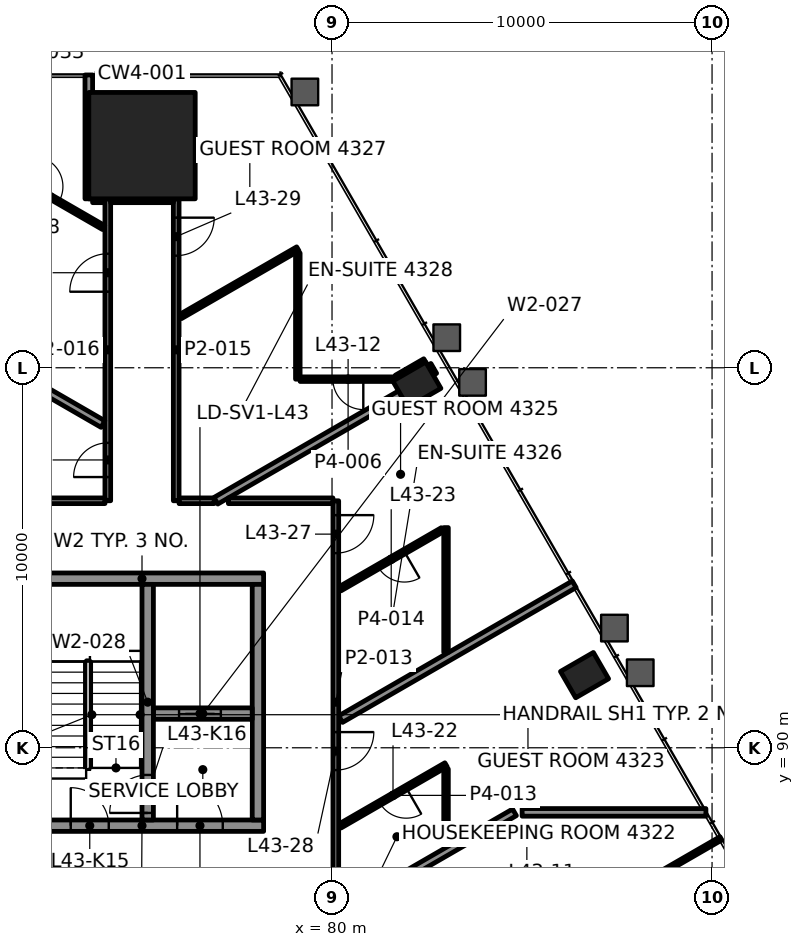
"""IFC4 building model, lengths in metres.
Left out: names, types, materials, properties, quantities, classifications, styles, units other than length and angle.
Written with IfcOpenShell. Run it as: python <this file> out.ifc"""

import sys

from ifc_helpers import new_model, si_unit, direction, frame, frame_2d, origin, origin_2d, place, context, subcontext, project, spatial, rectangle, hollow_rectangle, extrude, element, fill, save


model = new_model("IFC4")
c1 = context("Model", 3, precision=1e-05, world=origin(), true_north=direction((0.0, 1.0)))
c2 = subcontext(c1, "Body", "Model", "MODEL_VIEW")
j1 = project(units=[si_unit("LENGTHUNIT", "METRE"), si_unit("PLANEANGLEUNIT", "RADIAN")], contexts=[c1])
p1 = place(None, origin())
s1 = spatial("IfcSite", under=j1, at=p1, CompositionType="ELEMENT")
p2 = place(p1, origin())
s2 = spatial("IfcBuilding", under=s1, at=p2, CompositionType="ELEMENT")
p3 = place(p2, frame((0.0, 0.0, 187.0)))
s3 = spatial("IfcBuildingStorey", under=s2, at=p3, CompositionType="ELEMENT", Elevation=187.0)
p4 = place(p3, frame((75.0, 105.845, 0.0), z_axis=(0.0, 0.0, 1.0), x_axis=(-1.0, 0.0, 0.0)))
e1 = element("IfcColumn", 1, at=p4, inside=s3, PredefinedType="COLUMN", context=c2, shape_type="SweptSolid", body=[
    extrude(rectangle(XDim=2.8, YDim=2.8, at=origin_2d()), origin(), (0.0, 0.0, 1.0), 3.9),
])
for number, where, z_axis, x_axis in (
    (2, (86.645, 91.912, -0.0), (0.0, 0.0, 1.0), (-0.5, 0.866, 0.0)),
    (3, (82.232, 99.553, -0.0), (0.0, 0.0, 1.0), (-0.5, 0.866, 0.0)),
):
    element("IfcColumn", number, at=place(p3, frame(where, z_axis=z_axis, x_axis=x_axis)), inside=s3, PredefinedType="COLUMN", context=c2, shape_type="SweptSolid", body=[
        extrude(hollow_rectangle(XDim=0.8, YDim=1.0, WallThickness=0.05, at=origin_2d()), origin(), (0.0, 0.0, 1.0), 3.9),
    ])
p5 = place(p3, frame((71.8, 87.95, 0.0), z_axis=(0.0, 0.0, 1.0), x_axis=(1.0, 0.0, 0.0)))
e4 = element("IfcWall", 4, at=p5, inside=s3, PredefinedType="SHEAR", context=c2, shape_type="SweptSolid", body=[
    extrude(rectangle(XDim=6.4, YDim=0.3, at=frame_2d((3.2, 0.0))), origin(), (0.0, 0.0, 1.0), 3.7),
])
p6 = place(p5, frame((1.325, 0.0, 0.0)))
e5 = element("IfcOpeningElement", 5, at=p6, cuts=e4, PredefinedType="OPENING", context=c2, shape_type="SweptSolid", body=[
    extrude(rectangle(XDim=1.0, YDim=2.1, at=frame_2d((0.5, 1.05))), frame((0.0, 0.16, 0.0), z_axis=(0.0, -1.0, 0.0), x_axis=(1.0, 0.0, 0.0)), (0.0, 0.0, 1.0), 0.32),
])
p7 = place(p5, frame((4.125, 0.0, 0.0)))
e6 = element("IfcOpeningElement", 6, at=p7, cuts=e4, PredefinedType="OPENING", context=c2, shape_type="SweptSolid", body=[
    extrude(rectangle(XDim=1.2, YDim=2.1, at=frame_2d((0.6, 1.05))), frame((0.0, 0.16, 0.0), z_axis=(0.0, -1.0, 0.0), x_axis=(1.0, 0.0, 0.0)), (0.0, 0.0, 1.0), 0.32),
])
p8 = place(p3, frame((71.8, 94.45, 0.0), z_axis=(0.0, 0.0, 1.0), x_axis=(1.0, 0.0, 0.0)))
e7 = element("IfcWall", 7, at=p8, inside=s3, PredefinedType="SHEAR", context=c2, shape_type="SweptSolid", body=[
    extrude(rectangle(XDim=6.4, YDim=0.3, at=frame_2d((3.2, 0.0))), origin(), (0.0, 0.0, 1.0), 3.7),
])
p9 = place(p3, frame((78.05, 88.1, 0.0), z_axis=(0.0, 0.0, 1.0), x_axis=(0.0, 1.0, 0.0)))
e8 = element("IfcWall", 8, at=p9, inside=s3, PredefinedType="SHEAR", context=c2, shape_type="SweptSolid", body=[
    extrude(rectangle(XDim=6.2, YDim=0.3, at=frame_2d((3.1, 0.0))), origin(), (0.0, 0.0, 1.0), 3.7),
])
p10 = place(p3, frame((75.3, 90.9, 0.0), z_axis=(0.0, 0.0, 1.0), x_axis=(1.0, 0.0, 0.0)))
e9 = element("IfcWall", 9, at=p10, inside=s3, PredefinedType="SHEAR", context=c2, shape_type="SweptSolid", body=[
    extrude(rectangle(XDim=2.6, YDim=0.3, at=frame_2d((1.3, 0.0))), origin(), (0.0, 0.0, 1.0), 3.7),
])
p11 = place(p10, frame((0.675, 0.0, 0.0)))
e10 = element("IfcOpeningElement", 10, at=p11, cuts=e9, PredefinedType="OPENING", context=c2, shape_type="SweptSolid", body=[
    extrude(rectangle(XDim=1.1, YDim=2.1, at=frame_2d((0.55, 1.05))), frame((0.0, 0.16, 0.0), z_axis=(0.0, -1.0, 0.0), x_axis=(1.0, 0.0, 0.0)), (0.0, 0.0, 1.0), 0.32),
])
p12 = place(p3, frame((75.15, 88.1, 0.0), z_axis=(0.0, 0.0, 1.0), x_axis=(0.0, 1.0, 0.0)))
e11 = element("IfcWall", 11, at=p12, inside=s3, PredefinedType="SHEAR", context=c2, shape_type="SweptSolid", body=[
    extrude(rectangle(XDim=6.2, YDim=0.3, at=frame_2d((3.1, 0.0))), origin(), (0.0, 0.0, 1.0), 3.7),
])
p13 = place(p12, frame((0.185, 0.0, 0.0)))
e12 = element("IfcOpeningElement", 12, at=p13, cuts=e11, PredefinedType="OPENING", context=c2, shape_type="SweptSolid", body=[
    extrude(rectangle(XDim=1.0, YDim=2.1, at=frame_2d((0.5, 1.05))), frame((0.0, 0.16, 0.0), z_axis=(0.0, -1.0, 0.0), x_axis=(1.0, 0.0, 0.0)), (0.0, 0.0, 1.0), 0.32),
])
p14 = place(p3, frame((83.06, 87.8, 0.0), z_axis=(0.0, 0.0, 1.0), x_axis=(1.0, 0.0, 0.0)))
e13 = element("IfcWall", 13, at=p14, inside=s3, PredefinedType="PARTITIONING", context=c2, shape_type="SweptSolid", body=[
    extrude(rectangle(XDim=0.564, YDim=0.12, at=frame_2d((0.282, 0.0))), origin(), (0.0, 0.0, 1.0), 3.1),
])
p15 = place(p3, frame((85.002, 88.3, 0.0), z_axis=(0.0, 0.0, 1.0), x_axis=(1.0, 0.0, 0.0)))
e14 = element("IfcWall", 14, at=p15, inside=s3, PredefinedType="PARTITIONING", context=c2, shape_type="SweptSolid", body=[
    extrude(rectangle(XDim=4.836, YDim=0.2, at=frame_2d((2.418, 0.0))), origin(), (0.0, 0.0, 1.0), 3.022),
])
p16 = place(p3, frame((75.975, 96.5, 0.0), z_axis=(0.0, 0.0, 1.0), x_axis=(1.0, 0.0, 0.0)))
e15 = element("IfcWall", 15, at=p16, inside=s3, PredefinedType="PARTITIONING", context=c2, shape_type="SweptSolid", body=[
    extrude(rectangle(XDim=0.925, YDim=0.15, at=frame_2d((0.463, 0.0))), origin(), (0.0, 0.0, 1.0), 3.1),
])
p17 = place(p3, frame((81.686, 99.7, 0.0), z_axis=(0.0, 0.0, 1.0), x_axis=(-1.0, 0.0, 0.0)))
e16 = element("IfcWall", 16, at=p17, inside=s3, PredefinedType="PARTITIONING", context=c2, shape_type="SweptSolid", body=[
    extrude(rectangle(XDim=2.526, YDim=0.12, at=frame_2d((1.263, 0.0))), origin(), (0.0, 0.0, 1.0), 3.1),
])
p18 = place(p17, frame((0.863, 0.0, 0.0)))
e17 = element("IfcOpeningElement", 17, at=p18, cuts=e16, PredefinedType="OPENING", context=c2, shape_type="SweptSolid", body=[
    extrude(rectangle(XDim=0.8, YDim=2.1, at=frame_2d((0.4, 1.05))), frame((0.0, 0.07, 0.0), z_axis=(0.0, -1.0, 0.0), x_axis=(1.0, 0.0, 0.0)), (0.0, 0.0, 1.0), 0.14),
])
p19 = place(p3, frame((73.7, 104.445, 0.0), z_axis=(0.0, 0.0, 1.0), x_axis=(1.0, 0.0, 0.0)))
e18 = element("IfcWall", 18, at=p19, inside=s3, PredefinedType="PARTITIONING", context=c2, shape_type="SweptSolid", body=[
    extrude(rectangle(XDim=0.324, YDim=0.2, at=frame_2d((0.162, 0.0))), origin(), (0.0, 0.0, 1.0), 3.1),
])
p20 = place(p3, frame((85.737, 85.02, 0.0), z_axis=(0.0, 0.0, 1.0), x_axis=(0.866014867177, 0.500018249495, 0.0)))
e19 = element("IfcWall", 19, at=p20, inside=s3, PredefinedType="PARTITIONING", context=c2, shape_type="SweptSolid", body=[
    extrude(rectangle(XDim=5.192, YDim=0.1, at=frame_2d((2.596, 0.0))), origin(), (0.0, 0.0, 1.0), 3.022),
])
p21 = place(p3, frame((79.197, 85.065, 0.0), z_axis=(0.0, 0.0, 1.0), x_axis=(0.86602410867, 0.500002243197, 0.0)))
e20 = element("IfcWall", 20, at=p21, inside=s3, PredefinedType="PARTITIONING", context=c2, shape_type="SweptSolid", body=[
    extrude(rectangle(XDim=6.471, YDim=0.2, at=frame_2d((3.235, 0.0))), origin(), (0.0, 0.0, 1.0), 3.1),
])
p22 = place(p3, frame((83.0, 89.553, 0.0), z_axis=(0.0, 0.0, 1.0), x_axis=(-0.86604299788, -0.499969524894, 0.0)))
e21 = element("IfcWall", 21, at=p22, inside=s3, PredefinedType="PARTITIONING", context=c2, shape_type="SweptSolid", body=[
    extrude(rectangle(XDim=3.222, YDim=0.12, at=frame_2d((1.611, 0.0))), origin(), (0.0, 0.0, 1.0), 3.1),
])
p23 = place(p22, frame((1.211, 0.0, 0.0)))
e22 = element("IfcOpeningElement", 22, at=p23, cuts=e21, PredefinedType="OPENING", context=c2, shape_type="SweptSolid", body=[
    extrude(rectangle(XDim=0.8, YDim=2.1, at=frame_2d((0.4, 1.05))), frame((0.0, 0.07, 0.0), z_axis=(0.0, -1.0, 0.0), x_axis=(1.0, 0.0, 0.0)), (0.0, 0.0, 1.0), 0.14),
])
p24 = place(p3, frame((80.227, 90.754, 0.0), z_axis=(0.0, 0.0, 1.0), x_axis=(0.866028616566, 0.499994435258, 0.0)))
e23 = element("IfcWall", 23, at=p24, inside=s3, PredefinedType="PARTITIONING", context=c2, shape_type="SweptSolid", body=[
    extrude(rectangle(XDim=7.097, YDim=0.2, at=frame_2d((3.548, 0.0))), origin(), (0.0, 0.0, 1.0), 3.022),
])
p25 = place(p3, frame((82.905, 95.739, 0.0), z_axis=(0.0, 0.0, 1.0), x_axis=(-0.866028856698, -0.499994019331, 0.0)))
e24 = element("IfcWall", 24, at=p25, inside=s3, PredefinedType="PARTITIONING", context=c2, shape_type="SweptSolid", body=[
    extrude(rectangle(XDim=3.113, YDim=0.12, at=frame_2d((1.556, 0.0))), origin(), (0.0, 0.0, 1.0), 3.1),
])
p26 = place(p25, frame((1.156, 0.0, 0.0)))
e25 = element("IfcOpeningElement", 25, at=p26, cuts=e24, PredefinedType="OPENING", context=c2, shape_type="SweptSolid", body=[
    extrude(rectangle(XDim=0.8, YDim=2.1, at=frame_2d((0.4, 1.05))), frame((0.0, 0.07, 0.0), z_axis=(0.0, -1.0, 0.0), x_axis=(1.0, 0.0, 0.0)), (0.0, 0.0, 1.0), 0.14),
])
p27 = place(p3, frame((76.943, 96.5, 0.0), z_axis=(0.0, 0.0, 1.0), x_axis=(0.866015917575, 0.500016430238, 0.0)))
e26 = element("IfcWall", 26, at=p27, inside=s3, PredefinedType="PARTITIONING", context=c2, shape_type="SweptSolid", body=[
    extrude(rectangle(XDim=5.607, YDim=0.2, at=frame_2d((2.804, 0.0))), origin(), (0.0, 0.0, 1.0), 3.1),
])
p28 = place(p3, frame((81.712, 99.715, 0.0), z_axis=(0.0, 0.0, 1.0), x_axis=(0.866092063448, 0.499884524299, 0.0)))
e27 = element("IfcWall", 27, at=p28, inside=s3, PredefinedType="PARTITIONING", context=c2, shape_type="SweptSolid", body=[
    extrude(rectangle(XDim=0.869, YDim=0.2, at=frame_2d((0.435, 0.0))), origin(), (0.0, 0.0, 1.0), 3.1),
])
p29 = place(p3, frame((76.01, 101.346, 0.0), z_axis=(0.0, 0.0, 1.0), x_axis=(0.866045460162, 0.499965259726, 0.0)))
e28 = element("IfcWall", 28, at=p29, inside=s3, PredefinedType="PARTITIONING", context=c2, shape_type="SweptSolid", body=[
    extrude(rectangle(XDim=3.569, YDim=0.12, at=frame_2d((1.784, 0.0))), origin(), (0.0, 0.0, 1.0), 3.1),
])
p30 = place(p3, frame((83.0, 87.8, 0.0), z_axis=(0.0, 0.0, 1.0), x_axis=(0.0, 1.0, 0.0)))
e29 = element("IfcWall", 29, at=p30, inside=s3, PredefinedType="PARTITIONING", context=c2, shape_type="SweptSolid", body=[
    extrude(rectangle(XDim=1.644, YDim=0.12, at=frame_2d((0.822, 0.0))), origin(), (0.0, 0.0, 1.0), 3.1),
])
p31 = place(p3, frame((83.0, 92.51, 0.0), z_axis=(0.0, 0.0, 1.0), x_axis=(0.0, 1.0, 0.0)))
e30 = element("IfcWall", 30, at=p31, inside=s3, PredefinedType="PARTITIONING", context=c2, shape_type="SweptSolid", body=[
    extrude(rectangle(XDim=3.283, YDim=0.12, at=frame_2d((1.642, 0.0))), origin(), (0.0, 0.0, 1.0), 3.1),
])
p32 = place(p3, frame((80.1, 96.5, 0.0), z_axis=(0.0, 0.0, 1.0), x_axis=(0.0, -1.0, 0.0)))
e31 = element("IfcWall", 31, at=p32, inside=s3, PredefinedType="PARTITIONING", context=c2, shape_type="SweptSolid", body=[
    extrude(rectangle(XDim=10.6, YDim=0.15, at=frame_2d((5.3, 0.0))), origin(), (0.0, 0.0, 1.0), 3.022),
])
p33 = place(p32, frame((0.377, 0.0, 0.0)))
e32 = element("IfcOpeningElement", 32, at=p33, cuts=e31, PredefinedType="OPENING", context=c2, shape_type="SweptSolid", body=[
    extrude(rectangle(XDim=1.0, YDim=2.1, at=frame_2d((0.5, 1.05))), frame((0.0, 0.085, 0.0), z_axis=(0.0, -1.0, 0.0), x_axis=(1.0, 0.0, 0.0)), (0.0, 0.0, 1.0), 0.17),
])
p34 = place(p32, frame((6.087, 0.0, 0.0)))
e33 = element("IfcOpeningElement", 33, at=p34, cuts=e31, PredefinedType="OPENING", context=c2, shape_type="SweptSolid", body=[
    extrude(rectangle(XDim=1.0, YDim=2.1, at=frame_2d((0.5, 1.05))), frame((0.0, 0.085, 0.0), z_axis=(0.0, -1.0, 0.0), x_axis=(1.0, 0.0, 0.0)), (0.0, 0.0, 1.0), 0.17),
])
p35 = place(p3, frame((79.1, 99.7, 0.0), z_axis=(0.0, 0.0, 1.0), x_axis=(0.0, 1.0, 0.0)))
e34 = element("IfcWall", 34, at=p35, inside=s3, PredefinedType="PARTITIONING", context=c2, shape_type="SweptSolid", body=[
    extrude(rectangle(XDim=3.321, YDim=0.12, at=frame_2d((1.661, 0.0))), origin(), (0.0, 0.0, 1.0), 3.1),
])
p36 = place(p3, frame((75.9, 104.445, 0.0), z_axis=(0.0, 0.0, 1.0), x_axis=(0.0, -1.0, 0.0)))
e35 = element("IfcWall", 35, at=p36, inside=s3, PredefinedType="PARTITIONING", context=c2, shape_type="SweptSolid", body=[
    extrude(rectangle(XDim=7.945, YDim=0.15, at=frame_2d((3.972, 0.0))), origin(), (0.0, 0.0, 1.0), 3.1),
])
p37 = place(p36, frame((0.495, 0.0, 0.0)))
e36 = element("IfcOpeningElement", 36, at=p37, cuts=e35, PredefinedType="OPENING", context=c2, shape_type="SweptSolid", body=[
    extrude(rectangle(XDim=1.0, YDim=2.1, at=frame_2d((0.5, 1.05))), frame((0.0, 0.085, 0.0), z_axis=(0.0, -1.0, 0.0), x_axis=(1.0, 0.0, 0.0)), (0.0, 0.0, 1.0), 0.17),
])
p38 = place(p3, frame((74.1, 96.5, 0.0), z_axis=(0.0, 0.0, 1.0), x_axis=(0.0, 1.0, 0.0)))
e37 = element("IfcWall", 37, at=p38, inside=s3, PredefinedType="PARTITIONING", context=c2, shape_type="SweptSolid", body=[
    extrude(rectangle(XDim=7.945, YDim=0.15, at=frame_2d((3.973, 0.0))), origin(), (0.0, 0.0, 1.0), 3.1),
])
p39 = place(p38, frame((0.624, 0.0, 0.0)))
e38 = element("IfcOpeningElement", 38, at=p39, cuts=e37, PredefinedType="OPENING", context=c2, shape_type="SweptSolid", body=[
    extrude(rectangle(XDim=0.9, YDim=2.1, at=frame_2d((0.45, 1.05))), frame((0.0, 0.085, 0.0), z_axis=(0.0, -1.0, 0.0), x_axis=(1.0, 0.0, 0.0)), (0.0, 0.0, 1.0), 0.17),
])
p40 = place(p38, frame((5.501, 0.0, 0.0)))
e39 = element("IfcOpeningElement", 39, at=p40, cuts=e37, PredefinedType="OPENING", context=c2, shape_type="SweptSolid", body=[
    extrude(rectangle(XDim=1.0, YDim=2.1, at=frame_2d((0.5, 1.05))), frame((0.0, 0.085, 0.0), z_axis=(0.0, -1.0, 0.0), x_axis=(1.0, 0.0, 0.0)), (0.0, 0.0, 1.0), 0.17),
])
p41 = place(p3, frame((73.6, 104.446, 0.0), z_axis=(0.0, 0.0, 1.0), x_axis=(0.0, 1.0, 0.0)))
e40 = element("IfcWall", 40, at=p41, inside=s3, PredefinedType="PARTITIONING", context=c2, shape_type="SweptSolid", body=[
    extrude(rectangle(XDim=3.259, YDim=0.2, at=frame_2d((1.63, 0.0))), origin(), (0.0, 0.0, 1.0), 3.1),
])
p42 = place(p3, frame((82.665, 99.803, 0.0), z_axis=(0.0, 0.0, 1.0), x_axis=(-0.499910707084, 0.866076950936, 0.0)))
e41 = element("IfcWall", 41, at=p42, inside=s3, PredefinedType="PARTITIONING", context=c2, shape_type="SweptSolid", body=[
    extrude(rectangle(XDim=0.299, YDim=0.2, at=frame_2d((0.15, 0.0))), origin(), (0.0, 0.0, 1.0), 3.1),
])
p43 = place(p3, frame((71.2, 105.301, 0.0), z_axis=(0.0, 0.0, 1.0), x_axis=(0.866010186656, -0.500026355914, 0.0)))
e42 = element("IfcWall", 42, at=p43, inside=s3, PredefinedType="PARTITIONING", context=c2, shape_type="SweptSolid", body=[
    extrude(rectangle(XDim=3.222, YDim=0.12, at=frame_2d((1.611, 0.0))), origin(), (0.0, 0.0, 1.0), 3.1),
])
p44 = place(p43, frame((1.061, 0.0, 0.0)))
e43 = element("IfcOpeningElement", 43, at=p44, cuts=e42, PredefinedType="OPENING", context=c2, shape_type="SweptSolid", body=[
    extrude(rectangle(XDim=0.8, YDim=2.1, at=frame_2d((0.4, 1.05))), frame((0.0, 0.07, 0.0), z_axis=(0.0, -1.0, 0.0), x_axis=(1.0, 0.0, 0.0)), (0.0, 0.0, 1.0), 0.14),
])
p45 = place(p3, frame((73.973, 98.518, 0.0), z_axis=(0.0, 0.0, 1.0), x_axis=(-0.866017662945, 0.500013407287, 0.0)))
e44 = element("IfcWall", 44, at=p45, inside=s3, PredefinedType="PARTITIONING", context=c2, shape_type="SweptSolid", body=[
    extrude(rectangle(XDim=6.852, YDim=0.2, at=frame_2d((3.426, 0.0))), origin(), (0.0, 0.0, 1.0), 3.1),
])
p46 = place(p3, frame((70.875, 96.5, 0.0), z_axis=(0.0, 0.0, 1.0), x_axis=(1.0, 0.0, 0.0)))
e45 = element("IfcWall", 45, at=p46, inside=s3, PredefinedType="PARTITIONING", context=c2, shape_type="SweptSolid", body=[
    extrude(rectangle(XDim=3.149, YDim=0.15, at=frame_2d((1.575, 0.0))), origin(), (0.0, 0.0, 1.0), 3.1),
])
p47 = place(p3, frame((77.273, 96.5, 0.0), z_axis=(0.0, 0.0, 1.0), x_axis=(1.0, 0.0, 0.0)))
e46 = element("IfcWall", 46, at=p47, inside=s3, PredefinedType="PARTITIONING", context=c2, shape_type="SweptSolid", body=[
    extrude(rectangle(XDim=2.752, YDim=0.15, at=frame_2d((1.376, 0.0))), origin(), (0.0, 0.0, 1.0), 3.1),
])
p48 = place(p3, frame((74.175, 104.445, 0.0), z_axis=(0.0, 0.0, 1.0), x_axis=(1.0, 0.0, 0.0)))
e47 = element("IfcWall", 47, at=p48, inside=s3, PredefinedType="PARTITIONING", context=c2, shape_type="SweptSolid", body=[
    extrude(rectangle(XDim=1.649, YDim=0.2, at=frame_2d((0.825, 0.0))), origin(), (0.0, 0.0, 1.0), 3.097),
])
p49 = place(p18, origin())
e48 = element("IfcDoor", 48, at=p49, inside=s3, OperationType="SINGLE_SWING_RIGHT", PredefinedType="DOOR", context=c2, shape_type="SweptSolid", body=[
    extrude(rectangle(XDim=0.8, YDim=2.1, at=frame_2d((0.4, 1.05))), frame((0.0, 0.025, 0.0), z_axis=(0.0, -1.0, 0.0), x_axis=(1.0, 0.0, 0.0)), (0.0, 0.0, 1.0), 0.05),
])
fill(e17, e48)
p50 = place(p23, origin())
e49 = element("IfcDoor", 49, at=p50, inside=s3, OperationType="SINGLE_SWING_RIGHT", PredefinedType="DOOR", context=c2, shape_type="SweptSolid", body=[
    extrude(rectangle(XDim=0.8, YDim=2.1, at=frame_2d((0.4, 1.05))), frame((0.0, 0.025, 0.0), z_axis=(0.0, -1.0, 0.0), x_axis=(1.0, 0.0, 0.0)), (0.0, 0.0, 1.0), 0.05),
])
fill(e22, e49)
p51 = place(p26, origin())
e50 = element("IfcDoor", 50, at=p51, inside=s3, OperationType="SINGLE_SWING_RIGHT", PredefinedType="DOOR", context=c2, shape_type="SweptSolid", body=[
    extrude(rectangle(XDim=0.8, YDim=2.1, at=frame_2d((0.4, 1.05))), frame((0.0, 0.025, 0.0), z_axis=(0.0, -1.0, 0.0), x_axis=(1.0, 0.0, 0.0)), (0.0, 0.0, 1.0), 0.05),
])
fill(e25, e50)
p52 = place(p33, origin())
e51 = element("IfcDoor", 51, at=p52, inside=s3, OperationType="SINGLE_SWING_LEFT", PredefinedType="DOOR", context=c2, shape_type="SweptSolid", body=[
    extrude(rectangle(XDim=1.0, YDim=2.1, at=frame_2d((0.5, 1.05))), frame((0.0, 0.025, 0.0), z_axis=(0.0, -1.0, 0.0), x_axis=(1.0, 0.0, 0.0)), (0.0, 0.0, 1.0), 0.05),
])
fill(e32, e51)
p53 = place(p34, origin())
e52 = element("IfcDoor", 52, at=p53, inside=s3, OperationType="SINGLE_SWING_LEFT", PredefinedType="DOOR", context=c2, shape_type="SweptSolid", body=[
    extrude(rectangle(XDim=1.0, YDim=2.1, at=frame_2d((0.5, 1.05))), frame((0.0, 0.025, 0.0), z_axis=(0.0, -1.0, 0.0), x_axis=(1.0, 0.0, 0.0)), (0.0, 0.0, 1.0), 0.05),
])
fill(e33, e52)
p54 = place(p37, origin())
e53 = element("IfcDoor", 53, at=p54, inside=s3, OperationType="SINGLE_SWING_LEFT", PredefinedType="DOOR", context=c2, shape_type="SweptSolid", body=[
    extrude(rectangle(XDim=1.0, YDim=2.1, at=frame_2d((0.5, 1.05))), frame((0.0, 0.025, 0.0), z_axis=(0.0, -1.0, 0.0), x_axis=(1.0, 0.0, 0.0)), (0.0, 0.0, 1.0), 0.05),
])
fill(e36, e53)
p55 = place(p39, origin())
e54 = element("IfcDoor", 54, at=p55, inside=s3, OperationType="SINGLE_SWING_RIGHT", PredefinedType="DOOR", context=c2, shape_type="SweptSolid", body=[
    extrude(rectangle(XDim=0.9, YDim=2.1, at=frame_2d((0.45, 1.05))), frame((0.0, 0.025, 0.0), z_axis=(0.0, -1.0, 0.0), x_axis=(1.0, 0.0, 0.0)), (0.0, 0.0, 1.0), 0.05),
])
fill(e38, e54)
p56 = place(p40, origin())
e55 = element("IfcDoor", 55, at=p56, inside=s3, OperationType="SINGLE_SWING_RIGHT", PredefinedType="DOOR", context=c2, shape_type="SweptSolid", body=[
    extrude(rectangle(XDim=1.0, YDim=2.1, at=frame_2d((0.5, 1.05))), frame((0.0, 0.025, 0.0), z_axis=(0.0, -1.0, 0.0), x_axis=(1.0, 0.0, 0.0)), (0.0, 0.0, 1.0), 0.05),
])
fill(e39, e55)
p57 = place(p44, origin())
e56 = element("IfcDoor", 56, at=p57, inside=s3, OperationType="SINGLE_SWING_RIGHT", PredefinedType="DOOR", context=c2, shape_type="SweptSolid", body=[
    extrude(rectangle(XDim=0.8, YDim=2.1, at=frame_2d((0.4, 1.05))), frame((0.0, 0.025, 0.0), z_axis=(0.0, -1.0, 0.0), x_axis=(1.0, 0.0, 0.0)), (0.0, 0.0, 1.0), 0.05),
])
fill(e43, e56)
p58 = place(p3, origin())
p59 = place(p58, frame((85.989, 94.998, 0.15), z_axis=(0.0, 0.0, 1.0), x_axis=(-0.5, 0.866025, 0.0)))
p60 = place(p59, origin())
e57 = element("IfcWindow", 57, at=p60, inside=s3, PartitioningType="SINGLE_PANEL", PredefinedType="WINDOW", context=c2, shape_type="SweptSolid", body=[
    extrude(rectangle(XDim=2.866, YDim=3.55, at=frame_2d((1.433, 1.775))), frame((0.0, 0.03, 0.0), z_axis=(0.0, -1.0, 0.0), x_axis=(1.0, 0.0, 0.0)), (0.0, 0.0, 1.0), 0.06),
])
p61 = place(p11, origin())
e58 = element("IfcDoor", 58, at=p61, inside=s3, OperationType="DOUBLE_DOOR_SLIDING", PredefinedType="DOOR", context=c2, shape_type="SweptSolid", body=[
    extrude(rectangle(XDim=1.1, YDim=2.1, at=frame_2d((0.55, 1.05))), frame((0.0, 0.025, 0.0), z_axis=(0.0, -1.0, 0.0), x_axis=(1.0, 0.0, 0.0)), (0.0, 0.0, 1.0), 0.05),
])
fill(e10, e58)
p62 = place(p6, origin())
e59 = element("IfcDoor", 59, at=p62, inside=s3, OperationType="SINGLE_SWING_RIGHT", PredefinedType="DOOR", context=c2, shape_type="SweptSolid", body=[
    extrude(rectangle(XDim=1.0, YDim=2.1, at=frame_2d((0.5, 1.05))), frame((0.0, 0.025, 0.0), z_axis=(0.0, -1.0, 0.0), x_axis=(1.0, 0.0, 0.0)), (0.0, 0.0, 1.0), 0.05),
])
fill(e5, e59)
p63 = place(p13, origin())
e60 = element("IfcDoor", 60, at=p63, inside=s3, OperationType="SINGLE_SWING_LEFT", PredefinedType="DOOR", context=c2, shape_type="SweptSolid", body=[
    extrude(rectangle(XDim=1.0, YDim=2.1, at=frame_2d((0.5, 1.05))), frame((0.0, 0.025, 0.0), z_axis=(0.0, -1.0, 0.0), x_axis=(1.0, 0.0, 0.0)), (0.0, 0.0, 1.0), 0.05),
])
fill(e12, e60)
p64 = place(p7, origin())
e61 = element("IfcDoor", 61, at=p64, inside=s3, OperationType="SINGLE_SWING_RIGHT", PredefinedType="DOOR", context=c2, shape_type="SweptSolid", body=[
    extrude(rectangle(XDim=1.2, YDim=2.1, at=frame_2d((0.6, 1.05))), frame((0.0, 0.025, 0.0), z_axis=(0.0, -1.0, 0.0), x_axis=(1.0, 0.0, 0.0)), (0.0, 0.0, 1.0), 0.05),
])
fill(e6, e61)
save(model, sys.argv[1])
